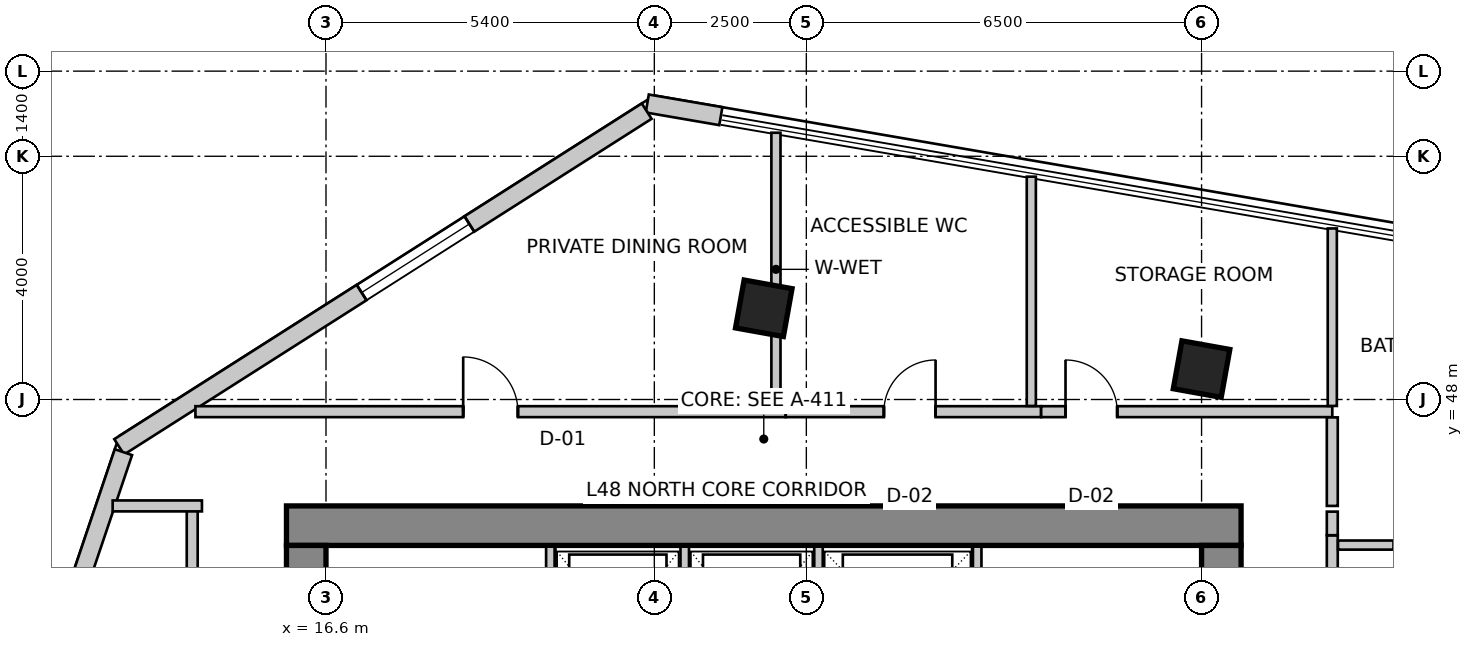
"""IFC4 building model, lengths in metres.
Left out: names, types, materials, properties, quantities, classifications, styles, units other than length and angle.
Written with IfcOpenShell. Run it as: python <this file> out.ifc"""

import sys

from ifc_helpers import new_model, si_unit, direction, frame, frame_2d, origin, origin_2d, place, context, subcontext, project, spatial, rectangle, extrude, source, transform, mapped, element, fill, save


model = new_model("IFC4")
c1 = context("Model", 3, precision=1e-05, world=origin(), true_north=direction((0.0, 1.0)))
c2 = subcontext(c1, "Body", "Model", "MODEL_VIEW")
j1 = project(units=[si_unit("LENGTHUNIT", "METRE"), si_unit("PLANEANGLEUNIT", "RADIAN")], contexts=[c1])
p1 = place(None, origin())
s1 = spatial("IfcSite", under=j1, at=p1, CompositionType="ELEMENT")
p2 = place(p1, origin())
s2 = spatial("IfcBuilding", under=s1, at=p2, CompositionType="ELEMENT")
p3 = place(p2, frame((0.0, 0.0, 193.9)))
s3 = spatial("IfcBuildingStorey", under=s2, at=p3, CompositionType="ELEMENT", Elevation=193.9)
p4 = place(p3, frame((15.95, 45.925, 0.0), z_axis=(0.0, 0.0, 1.0), x_axis=(1.0, 0.0, 0.0)))
e1 = element("IfcWall", 1, at=p4, inside=s3, PredefinedType="SHEAR", context=c2, shape_type="SweptSolid", body=[
    extrude(rectangle(XDim=15.7, YDim=0.65, at=frame_2d((7.85, 0.0))), origin(), (0.0, 0.0, 1.0), 3.5),
])
p5 = place(p3, frame((16.275, 34.2, 0.0), z_axis=(0.0, 0.0, 1.0), x_axis=(0.0, 1.0, 0.0)))
e2 = element("IfcWall", 2, at=p5, inside=s3, PredefinedType="SHEAR", context=c2, shape_type="SweptSolid", body=[
    extrude(rectangle(XDim=11.4, YDim=0.65, at=frame_2d((5.7, 0.0))), origin(), (0.0, 0.0, 1.0), 3.5),
])
m1 = source(origin(), c2, "Body", "SweptSolid", [
    extrude(rectangle(XDim=1.1, YDim=2.15, at=frame_2d((0.55, 1.075))), frame((0.0, 0.335, 0.0), z_axis=(0.0, -1.0, 0.0), x_axis=(1.0, 0.0, 0.0)), (0.0, 0.0, 1.0), 0.67),
])
p6 = place(p5, frame((7.15, 0.0, 0.0)))
e3 = element("IfcOpeningElement", 3, at=p6, cuts=e2, PredefinedType="OPENING", context=c2, shape_type="MappedRepresentation", body=[
    mapped(m1, transform((0.0, 0.0, 0.0), scale=1.0)),
])
p7 = place(p3, frame((31.325, 34.2, 0.0), z_axis=(0.0, 0.0, 1.0), x_axis=(0.0, 1.0, 0.0)))
e4 = element("IfcWall", 4, at=p7, inside=s3, PredefinedType="SHEAR", context=c2, shape_type="SweptSolid", body=[
    extrude(rectangle(XDim=11.4, YDim=0.65, at=frame_2d((5.7, 0.0))), origin(), (0.0, 0.0, 1.0), 3.5),
])
p8 = place(p7, frame((7.35, 0.0, 0.0)))
e5 = element("IfcOpeningElement", 5, at=p8, cuts=e4, PredefinedType="OPENING", context=c2, shape_type="MappedRepresentation", body=[
    mapped(m1, transform((0.0, 0.0, 0.0), scale=1.0)),
])
m2 = source(origin(), c2, "Body", "SweptSolid", [
    extrude(rectangle(XDim=0.8, YDim=0.8, at=origin_2d()), origin(), (0.0, 0.0, 1.0), 3.5),
])
for number, where, z_axis, x_axis in (
    (6, (23.8, 49.5, 0.0), (0.0, 0.0, 1.0), (0.984, -0.177, 0.0)),
    (7, (31.0, 48.5, 0.0), (0.0, 0.0, 1.0), (0.984, -0.177, 0.0)),
):
    element("IfcColumn", number, at=place(p3, frame(where, z_axis=z_axis, x_axis=x_axis)), inside=s3, PredefinedType="COLUMN", context=c2, shape_type="MappedRepresentation", body=[
        mapped(m2, transform((0.0, 0.0, 0.0), scale=1.0)),
    ])
p9 = place(p3, frame((23.094, 52.66, 0.0), z_axis=(0.0, 0.0, 1.0), x_axis=(-0.985503719785, 0.169653818966, 0.0)))
e8 = element("IfcWall", 8, at=p9, inside=s3, PredefinedType="SOLIDWALL", context=c2, shape_type="SweptSolid", body=[
    extrude(rectangle(XDim=1.228, YDim=0.3, at=frame_2d((0.614, 0.0))), origin(), (0.0, 0.0, 1.0), 3.25),
])
p10 = place(p3, frame((21.875, 52.742, 0.0), z_axis=(0.0, 0.0, 1.0), x_axis=(-0.843666375448, -0.536867811419, 0.0)))
e9 = element("IfcWall", 9, at=p10, inside=s3, PredefinedType="SOLIDWALL", context=c2, shape_type="SweptSolid", body=[
    extrude(rectangle(XDim=10.284, YDim=0.3, at=frame_2d((5.142, 0.0))), origin(), (0.0, 0.0, 1.0), 3.25),
])
m3 = source(origin(), c2, "Body", "SweptSolid", [
    extrude(rectangle(XDim=2.1, YDim=2.0, at=frame_2d((1.05, 1.0))), frame((0.0, 0.16, 0.0), z_axis=(0.0, -1.0, 0.0), x_axis=(1.0, 0.0, 0.0)), (0.0, 0.0, 1.0), 0.32),
])
p11 = place(p10, frame((3.457, 0.0, 0.85)))
e10 = element("IfcOpeningElement", 10, at=p11, cuts=e9, PredefinedType="OPENING", context=c2, shape_type="MappedRepresentation", body=[
    mapped(m3, transform((0.0, 0.0, 0.0), scale=1.0)),
])
p12 = place(p3, frame((13.269, 47.134, 0.0), z_axis=(0.0, 0.0, 1.0), x_axis=(-0.319920776449, -0.947444297464, 0.0)))
e11 = element("IfcWall", 11, at=p12, inside=s3, PredefinedType="SOLIDWALL", context=c2, shape_type="SweptSolid", body=[
    extrude(rectangle(XDim=16.133, YDim=0.3, at=frame_2d((8.067, 0.0))), origin(), (0.0, 0.0, 1.0), 3.25),
])
m4 = source(origin(), c2, "Body", "SweptSolid", [
    extrude(rectangle(XDim=2.4, YDim=2.2, at=frame_2d((1.2, 1.1))), frame((0.0, 0.16, 0.0), z_axis=(0.0, -1.0, 0.0), x_axis=(1.0, 0.0, 0.0)), (0.0, 0.0, 1.0), 0.32),
])
p13 = place(p12, frame((2.363, 0.0, 0.85)))
e12 = element("IfcOpeningElement", 12, at=p13, cuts=e11, PredefinedType="OPENING", context=c2, shape_type="MappedRepresentation", body=[
    mapped(m4, transform((0.0, 0.0, 0.0), scale=1.0)),
])
p14 = place(p12, frame((7.41, 0.0, 0.85)))
e13 = element("IfcOpeningElement", 13, at=p14, cuts=e11, PredefinedType="OPENING", context=c2, shape_type="MappedRepresentation", body=[
    mapped(m3, transform((0.0, 0.0, 0.0), scale=1.0)),
])
p15 = place(p12, frame((12.157, 0.0, 0.85)))
e14 = element("IfcOpeningElement", 14, at=p15, cuts=e11, PredefinedType="OPENING", context=c2, shape_type="MappedRepresentation", body=[
    mapped(m4, transform((0.0, 0.0, 0.0), scale=1.0)),
])
for number, where, z_axis, x_axis in (
    (15, (20.29, 43.28, 0.0), (0.0, 0.0, 1.0), (0.0, 1.0, 0.0)),
    (16, (27.31, 43.28, 0.0), (0.0, 0.0, 1.0), (0.0, 1.0, 0.0)),
):
    element("IfcWall", number, at=place(p3, frame(where, z_axis=z_axis, x_axis=x_axis)), inside=s3, PredefinedType="SOLIDWALL", context=c2, shape_type="SweptSolid", body=[
        extrude(rectangle(XDim=2.3, YDim=0.14, at=frame_2d((1.15, 0.0))), origin(), (0.0, 0.0, 1.0), 3.25),
    ])
for number, where, z_axis, x_axis in (
    (17, (22.5, 43.02, 0.0), (0.0, 0.0, 1.0), (0.0, 1.0, 0.0)),
    (18, (24.7, 43.02, 0.0), (0.0, 0.0, 1.0), (0.0, 1.0, 0.0)),
):
    element("IfcWall", number, at=place(p3, frame(where, z_axis=z_axis, x_axis=x_axis)), inside=s3, PredefinedType="SOLIDWALL", context=c2, shape_type="SweptSolid", body=[
        extrude(rectangle(XDim=2.56, YDim=0.14, at=frame_2d((1.28, 0.0))), origin(), (0.0, 0.0, 1.0), 3.25),
    ])
p16 = place(p3, frame((14.4, 33.644, 0.0), z_axis=(0.0, 0.0, 1.0), x_axis=(0.0, 1.0, 0.0)))
e19 = element("IfcWall", 19, at=p16, inside=s3, PredefinedType="PARTITIONING", context=c2, shape_type="SweptSolid", body=[
    extrude(rectangle(XDim=12.606, YDim=0.18, at=frame_2d((6.303, 0.0))), origin(), (0.0, 0.0, 1.0), 3.25),
])
m5 = source(origin(), c2, "Body", "SweptSolid", [
    extrude(rectangle(XDim=0.9, YDim=2.15, at=frame_2d((0.45, 1.075))), frame((0.0, 0.1, 0.0), z_axis=(0.0, -1.0, 0.0), x_axis=(1.0, 0.0, 0.0)), (0.0, 0.0, 1.0), 0.2),
])
p17 = place(p16, frame((4.399, 0.0, 0.0)))
e20 = element("IfcOpeningElement", 20, at=p17, cuts=e19, PredefinedType="OPENING", context=c2, shape_type="MappedRepresentation", body=[
    mapped(m5, transform((0.0, 0.0, 0.0), scale=1.0)),
])
p18 = place(p3, frame((14.56, 46.25, 0.0), z_axis=(0.0, 0.0, 1.0), x_axis=(-1.0, 0.0, 0.0)))
e21 = element("IfcWall", 21, at=p18, inside=s3, PredefinedType="PARTITIONING", context=c2, shape_type="SweptSolid", body=[
    extrude(rectangle(XDim=1.469, YDim=0.18, at=frame_2d((0.734, 0.0))), origin(), (0.0, 0.0, 1.0), 3.25),
])
p19 = place(p3, frame((14.453, 47.8, 0.0), z_axis=(0.0, 0.0, 1.0), x_axis=(1.0, 0.0, 0.0)))
e22 = element("IfcWall", 22, at=p19, inside=s3, PredefinedType="PARTITIONING", context=c2, shape_type="SweptSolid", body=[
    extrude(rectangle(XDim=9.707, YDim=0.18, at=frame_2d((4.854, 0.0))), origin(), (0.0, 0.0, 1.0), 2.835),
])
p20 = place(p19, frame((4.404, 0.0, 0.0)))
e23 = element("IfcOpeningElement", 23, at=p20, cuts=e22, PredefinedType="OPENING", context=c2, shape_type="MappedRepresentation", body=[
    mapped(m5, transform((0.0, 0.0, 0.0), scale=1.0)),
])
p21 = place(p3, frame((24.162, 47.8, 0.0), z_axis=(0.0, 0.0, 1.0), x_axis=(1.0, 0.0, 0.0)))
e24 = element("IfcWall", 24, at=p21, inside=s3, PredefinedType="PARTITIONING", context=c2, shape_type="SweptSolid", body=[
    extrude(rectangle(XDim=4.198, YDim=0.18, at=frame_2d((2.099, 0.0))), origin(), (0.0, 0.0, 1.0), 3.25),
])
m6 = source(origin(), c2, "Body", "SweptSolid", [
    extrude(rectangle(XDim=0.85, YDim=2.15, at=frame_2d((0.425, 1.075))), frame((0.0, 0.1, 0.0), z_axis=(0.0, -1.0, 0.0), x_axis=(1.0, 0.0, 0.0)), (0.0, 0.0, 1.0), 0.2),
])
p22 = place(p21, frame((1.613, 0.0, 0.0)))
e25 = element("IfcOpeningElement", 25, at=p22, cuts=e24, PredefinedType="OPENING", context=c2, shape_type="MappedRepresentation", body=[
    mapped(m6, transform((0.0, 0.0, 0.0), scale=1.0)),
])
p23 = place(p3, frame((28.362, 47.8, 0.0), z_axis=(0.0, 0.0, 1.0), x_axis=(1.0, 0.0, 0.0)))
e26 = element("IfcWall", 26, at=p23, inside=s3, PredefinedType="PARTITIONING", context=c2, shape_type="SweptSolid", body=[
    extrude(rectangle(XDim=4.788, YDim=0.18, at=frame_2d((2.394, 0.0))), origin(), (0.0, 0.0, 1.0), 2.688),
])
p24 = place(p23, frame((0.401, 0.0, 0.0)))
e27 = element("IfcOpeningElement", 27, at=p24, cuts=e26, PredefinedType="OPENING", context=c2, shape_type="MappedRepresentation", body=[
    mapped(m6, transform((0.0, 0.0, 0.0), scale=1.0)),
])
p25 = place(p3, frame((33.15, 47.706, 0.0), z_axis=(0.0, 0.0, 1.0), x_axis=(0.0, -1.0, 0.0)))
e28 = element("IfcWall", 28, at=p25, inside=s3, PredefinedType="PARTITIONING", context=c2, shape_type="SweptSolid", body=[
    extrude(rectangle(XDim=1.456, YDim=0.18, at=frame_2d((0.728, 0.0))), origin(), (0.0, 0.0, 1.0), 2.688),
])
p26 = place(p3, frame((33.15, 45.766, 0.0), z_axis=(0.0, 0.0, 1.0), x_axis=(0.0, -1.0, 0.0)))
e29 = element("IfcWall", 29, at=p26, inside=s3, PredefinedType="PARTITIONING", context=c2, shape_type="SweptSolid", body=[
    extrude(rectangle(XDim=5.526, YDim=0.18, at=frame_2d((2.763, 0.0))), origin(), (0.0, 0.0, 1.0), 2.688),
])
p27 = place(p3, frame((33.15, 46.156, 0.0), z_axis=(0.0, 0.0, 1.0), x_axis=(0.0, -1.0, 0.0)))
e30 = element("IfcWall", 30, at=p27, inside=s3, PredefinedType="PARTITIONING", context=c2, shape_type="SweptSolid", body=[
    extrude(rectangle(XDim=0.388, YDim=0.18, at=frame_2d((0.194, 0.0))), origin(), (0.0, 0.0, 1.0), 3.25),
])
p28 = place(p3, frame((24.0, 52.387, 0.0), z_axis=(0.0, 0.0, 1.0), x_axis=(0.0, -1.0, 0.0)))
e31 = element("IfcWall", 31, at=p28, inside=s3, PredefinedType="PARTITIONING", context=c2, shape_type="SweptSolid", body=[
    extrude(rectangle(XDim=4.493, YDim=0.15, at=frame_2d((2.247, 0.0))), origin(), (0.0, 0.0, 1.0), 2.542),
])
p29 = place(p3, frame((28.2, 51.665, 0.0), z_axis=(0.0, 0.0, 1.0), x_axis=(0.0, -1.0, 0.0)))
e32 = element("IfcWall", 32, at=p29, inside=s3, PredefinedType="PARTITIONING", context=c2, shape_type="SweptSolid", body=[
    extrude(rectangle(XDim=3.771, YDim=0.15, at=frame_2d((1.885, 0.0))), origin(), (0.0, 0.0, 1.0), 2.542),
])
p30 = place(p3, frame((33.15, 50.813, 0.0), z_axis=(0.0, 0.0, 1.0), x_axis=(0.0, -1.0, 0.0)))
e33 = element("IfcWall", 33, at=p30, inside=s3, PredefinedType="PARTITIONING", context=c2, shape_type="SweptSolid", body=[
    extrude(rectangle(XDim=2.919, YDim=0.15, at=frame_2d((1.459, 0.0))), origin(), (0.0, 0.0, 1.0), 2.542),
])
p31 = place(p3, frame((33.244, 45.606, 0.0), z_axis=(0.0, 0.0, 1.0), x_axis=(1.0, 0.0, 0.0)))
e34 = element("IfcWall", 34, at=p31, inside=s3, PredefinedType="PARTITIONING", context=c2, shape_type="SweptSolid", body=[
    extrude(rectangle(XDim=2.816, YDim=0.15, at=frame_2d((1.408, 0.0))), origin(), (0.0, 0.0, 1.0), 2.688),
])
m7 = source(origin(), c2, "Body", "SweptSolid", [
    extrude(rectangle(XDim=0.85, YDim=2.15, at=frame_2d((0.425, 1.075))), frame((0.0, 0.085, 0.0), z_axis=(0.0, -1.0, 0.0), x_axis=(1.0, 0.0, 0.0)), (0.0, 0.0, 1.0), 0.17),
])
p32 = place(p31, frame((0.919, 0.0, 0.0)))
e35 = element("IfcOpeningElement", 35, at=p32, cuts=e34, PredefinedType="OPENING", context=c2, shape_type="MappedRepresentation", body=[
    mapped(m7, transform((0.0, 0.0, 0.0), scale=1.0)),
])
m8 = source(origin(), c2, "Body", "SweptSolid", [
    extrude(rectangle(XDim=2.1, YDim=2.0, at=frame_2d((1.05, 1.0))), frame((0.0, -0.015, 0.0), z_axis=(0.0, -1.0, 0.0), x_axis=(1.0, 0.0, 0.0)), (0.0, 0.0, 1.0), 0.06),
])
p33 = place(p11, origin())
e36 = element("IfcWindow", 36, at=p33, inside=s3, PartitioningType="SINGLE_PANEL", PredefinedType="WINDOW", context=c2, shape_type="MappedRepresentation", body=[
    mapped(m8, transform((0.0, 0.0, 0.0), scale=1.0)),
])
fill(e10, e36)
m9 = source(origin(), c2, "Body", "SweptSolid", [
    extrude(rectangle(XDim=0.9, YDim=2.15, at=frame_2d((0.45, 1.075))), frame((0.0, 0.025, 0.0), z_axis=(0.0, -1.0, 0.0), x_axis=(1.0, 0.0, 0.0)), (0.0, 0.0, 1.0), 0.05),
])
p34 = place(p20, origin())
e37 = element("IfcDoor", 37, at=p34, inside=s3, OperationType="SINGLE_SWING_LEFT", PredefinedType="DOOR", context=c2, shape_type="MappedRepresentation", body=[
    mapped(m9, transform((0.0, 0.0, 0.0), scale=1.0)),
])
fill(e23, e37)
m10 = source(origin(), c2, "Body", "SweptSolid", [
    extrude(rectangle(XDim=0.85, YDim=2.15, at=frame_2d((0.425, 1.075))), frame((0.0, 0.025, 0.0), z_axis=(0.0, -1.0, 0.0), x_axis=(1.0, 0.0, 0.0)), (0.0, 0.0, 1.0), 0.05),
])
p35 = place(p22, origin())
e38 = element("IfcDoor", 38, at=p35, inside=s3, OperationType="SINGLE_SWING_RIGHT", PredefinedType="DOOR", context=c2, shape_type="MappedRepresentation", body=[
    mapped(m10, transform((0.0, 0.0, 0.0), scale=1.0)),
])
fill(e25, e38)
p36 = place(p24, origin())
e39 = element("IfcDoor", 39, at=p36, inside=s3, OperationType="SINGLE_SWING_LEFT", PredefinedType="DOOR", context=c2, shape_type="MappedRepresentation", body=[
    mapped(m10, transform((0.0, 0.0, 0.0), scale=1.0)),
])
fill(e27, e39)
save(model, sys.argv[1])
